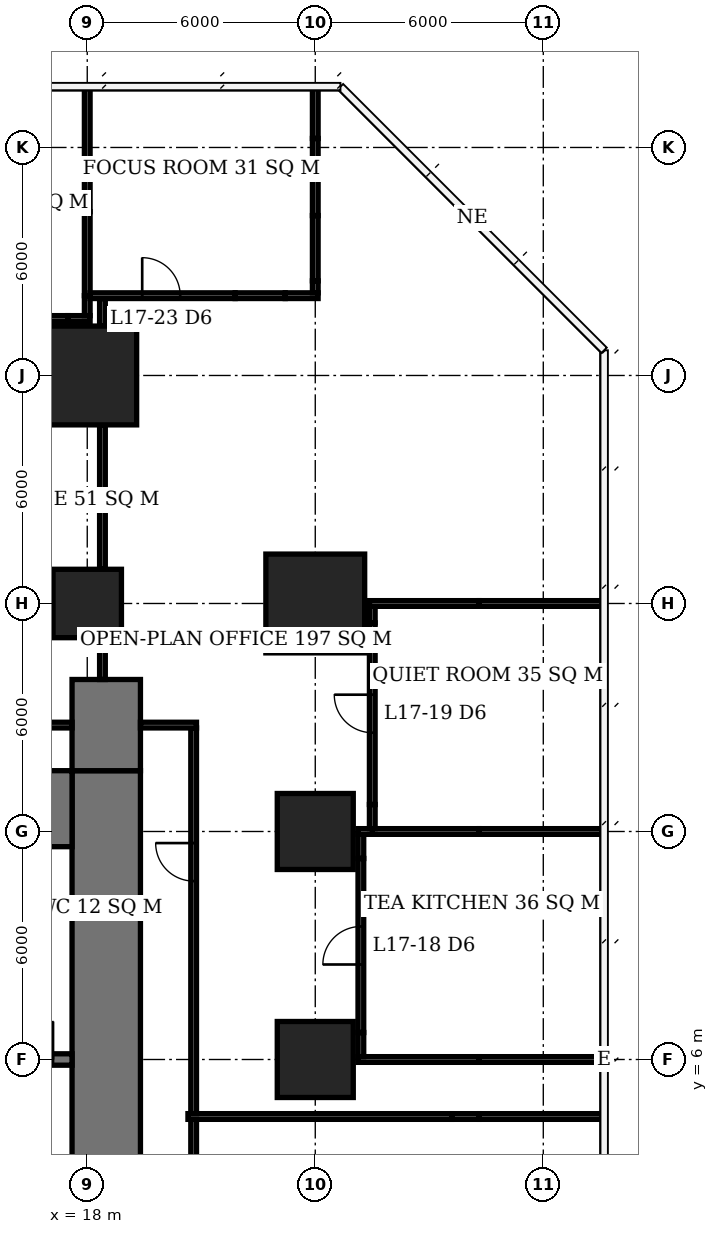
"""IFC4 building model, lengths in metres.
Left out: names, types, materials, properties, quantities, classifications, styles, units other than length and angle.
Written with IfcOpenShell. Run it as: python <this file> out.ifc"""

import sys

from ifc_helpers import new_model, si_unit, direction, frame, frame_2d, origin, origin_2d, place, context, subcontext, project, spatial, rectangle, extrude, element, fill, save


model = new_model("IFC4")
c1 = context("Model", 3, precision=1e-05, world=origin(), true_north=direction((0.0, 1.0)))
c2 = subcontext(c1, "Body", "Model", "MODEL_VIEW")
j1 = project(units=[si_unit("LENGTHUNIT", "METRE"), si_unit("PLANEANGLEUNIT", "RADIAN")], contexts=[c1])
p1 = place(None, origin())
s1 = spatial("IfcSite", under=j1, at=p1, CompositionType="ELEMENT")
p2 = place(p1, origin())
s2 = spatial("IfcBuilding", under=s1, at=p2, CompositionType="ELEMENT")
p3 = place(p2, frame((0.0, 0.0, 72.8)))
s3 = spatial("IfcBuildingStorey", under=s2, at=p3, CompositionType="ELEMENT", Elevation=72.8)
p4 = place(p3, frame((18.0, 18.0, 0.0), z_axis=(0.0, 0.0, 1.0), x_axis=(1.0, 0.0, 0.0)))
e1 = element("IfcColumn", 1, at=p4, inside=s3, PredefinedType="COLUMN", context=c2, shape_type="SweptSolid", body=[
    extrude(rectangle(XDim=1.8, YDim=1.8, at=origin_2d()), origin(), (0.0, 0.0, 1.0), 3.9),
])
p5 = place(p3, frame((18.0, 24.0, 0.0), z_axis=(0.0, 0.0, 1.0), x_axis=(1.0, 0.0, 0.0)))
e2 = element("IfcColumn", 2, at=p5, inside=s3, PredefinedType="COLUMN", context=c2, shape_type="SweptSolid", body=[
    extrude(rectangle(XDim=2.6, YDim=2.6, at=origin_2d()), origin(), (0.0, 0.0, 1.0), 3.9),
])
for number, where, z_axis, x_axis in (
    (3, (24.0, 6.0, 0.0), (0.0, 0.0, 1.0), (1.0, 0.0, 0.0)),
    (4, (24.0, 12.0, 0.0), (0.0, 0.0, 1.0), (1.0, 0.0, 0.0)),
):
    element("IfcColumn", number, at=place(p3, frame(where, z_axis=z_axis, x_axis=x_axis)), inside=s3, PredefinedType="COLUMN", context=c2, shape_type="SweptSolid", body=[
        extrude(rectangle(XDim=2.0, YDim=2.0, at=origin_2d()), origin(), (0.0, 0.0, 1.0), 3.9),
    ])
p6 = place(p3, frame((24.0, 18.0, 0.0), z_axis=(0.0, 0.0, 1.0), x_axis=(1.0, 0.0, 0.0)))
e5 = element("IfcColumn", 5, at=p6, inside=s3, PredefinedType="COLUMN", context=c2, shape_type="SweptSolid", body=[
    extrude(rectangle(XDim=2.6, YDim=2.6, at=origin_2d()), origin(), (0.0, 0.0, 1.0), 3.9),
])
p7 = place(p3, frame((-5.6, 12.6, 0.0), z_axis=(0.0, 0.0, 1.0), x_axis=(1.0, 0.0, 0.0)))
e6 = element("IfcWall", 6, at=p7, inside=s3, PredefinedType="SHEAR", context=c2, shape_type="SweptSolid", body=[
    extrude(rectangle(XDim=23.2, YDim=2.0, at=frame_2d((11.6, 0.0))), origin(), (0.0, 0.0, 1.0), 3.9),
])
p8 = place(p3, frame((18.5, -7.6, 0.0), z_axis=(0.0, 0.0, 1.0), x_axis=(0.0, 1.0, 0.0)))
e7 = element("IfcWall", 7, at=p8, inside=s3, PredefinedType="SHEAR", context=c2, shape_type="SweptSolid", body=[
    extrude(rectangle(XDim=21.2, YDim=1.8, at=frame_2d((10.6, 0.0))), origin(), (0.0, 0.0, 1.0), 3.9),
])
p9 = place(p8, frame((9.2, 0.0, 0.0)))
e8 = element("IfcOpeningElement", 8, at=p9, cuts=e7, PredefinedType="OPENING", context=c2, shape_type="SweptSolid", body=[
    extrude(rectangle(XDim=1.8, YDim=2.4, at=frame_2d((0.9, 1.2))), frame((0.0, 0.91, 0.0), z_axis=(0.0, -1.0, 0.0), x_axis=(1.0, 0.0, 0.0)), (0.0, 0.0, 1.0), 1.82),
])
p10 = place(p3, frame((18.5, 13.6, 0.0), z_axis=(0.0, 0.0, 1.0), x_axis=(0.0, 1.0, 0.0)))
e9 = element("IfcWall", 9, at=p10, inside=s3, PredefinedType="SHEAR", context=c2, shape_type="SweptSolid", body=[
    extrude(rectangle(XDim=2.4, YDim=1.8, at=frame_2d((1.2, 0.0))), origin(), (0.0, 0.0, 1.0), 3.9),
])
p11 = place(p3, frame((-0.15, 6.0, 0.0), z_axis=(0.0, 0.0, 1.0), x_axis=(1.0, 0.0, 0.0)))
e10 = element("IfcWall", 10, at=p11, inside=s3, PredefinedType="SHEAR", context=c2, shape_type="SweptSolid", body=[
    extrude(rectangle(XDim=17.75, YDim=0.3, at=frame_2d((8.875, 0.0))), origin(), (0.0, 0.0, 1.0), 3.9),
])
p12 = place(p11, frame((13.15, 0.0, 0.0)))
e11 = element("IfcOpeningElement", 11, at=p12, cuts=e10, PredefinedType="OPENING", context=c2, shape_type="SweptSolid", body=[
    extrude(rectangle(XDim=0.9, YDim=2.1, at=frame_2d((0.45, 1.05))), frame((0.0, 0.16, 0.0), z_axis=(0.0, -1.0, 0.0), x_axis=(1.0, 0.0, 0.0)), (0.0, 0.0, 1.0), 0.32),
])
p13 = place(p11, frame((16.25, 0.0, 0.0)))
e12 = element("IfcOpeningElement", 12, at=p13, cuts=e10, PredefinedType="OPENING", context=c2, shape_type="SweptSolid", body=[
    extrude(rectangle(XDim=1.0, YDim=2.1, at=frame_2d((0.5, 1.05))), frame((0.0, 0.16, 0.0), z_axis=(0.0, -1.0, 0.0), x_axis=(1.0, 0.0, 0.0)), (0.0, 0.0, 1.0), 0.32),
])
p14 = place(p11, frame((1.1, 0.0, 0.0)))
e13 = element("IfcOpeningElement", 13, at=p14, cuts=e10, PredefinedType="OPENING", context=c2, shape_type="SweptSolid", body=[
    extrude(rectangle(XDim=1.1, YDim=2.1, at=frame_2d((0.55, 1.05))), frame((0.0, 0.16, 0.0), z_axis=(0.0, -1.0, 0.0), x_axis=(1.0, 0.0, 0.0)), (0.0, 0.0, 1.0), 0.32),
])
p15 = place(p11, frame((4.1, 0.0, 0.0)))
e14 = element("IfcOpeningElement", 14, at=p15, cuts=e10, PredefinedType="OPENING", context=c2, shape_type="SweptSolid", body=[
    extrude(rectangle(XDim=1.1, YDim=2.1, at=frame_2d((0.55, 1.05))), frame((0.0, 0.16, 0.0), z_axis=(0.0, -1.0, 0.0), x_axis=(1.0, 0.0, 0.0)), (0.0, 0.0, 1.0), 0.32),
])
p16 = place(p11, frame((7.1, 0.0, 0.0)))
e15 = element("IfcOpeningElement", 15, at=p16, cuts=e10, PredefinedType="OPENING", context=c2, shape_type="SweptSolid", body=[
    extrude(rectangle(XDim=1.1, YDim=2.1, at=frame_2d((0.55, 1.05))), frame((0.0, 0.16, 0.0), z_axis=(0.0, -1.0, 0.0), x_axis=(1.0, 0.0, 0.0)), (0.0, 0.0, 1.0), 0.32),
])
p17 = place(p11, frame((10.1, 0.0, 0.0)))
e16 = element("IfcOpeningElement", 16, at=p17, cuts=e10, PredefinedType="OPENING", context=c2, shape_type="SweptSolid", body=[
    extrude(rectangle(XDim=1.1, YDim=2.1, at=frame_2d((0.55, 1.05))), frame((0.0, 0.16, 0.0), z_axis=(0.0, -1.0, 0.0), x_axis=(1.0, 0.0, 0.0)), (0.0, 0.0, 1.0), 0.32),
])
p18 = place(p3, frame((25.125, 6.0, 0.0), z_axis=(0.0, 0.0, 1.0), x_axis=(1.0, 0.0, 0.0)))
e17 = element("IfcWall", 17, at=p18, inside=s3, PredefinedType="PARTITIONING", context=c2, shape_type="SweptSolid", body=[
    extrude(rectangle(XDim=3.185, YDim=0.15, at=frame_2d((1.593, 0.0))), origin(), (0.0, 0.0, 1.0), 2.65),
])
p19 = place(p3, frame((28.31, 6.0, 0.0), z_axis=(0.0, 0.0, 1.0), x_axis=(1.0, 0.0, 0.0)))
e18 = element("IfcWall", 18, at=p19, inside=s3, PredefinedType="PARTITIONING", context=c2, shape_type="SweptSolid", body=[
    extrude(rectangle(XDim=3.24, YDim=0.15, at=frame_2d((1.62, 0.0))), origin(), (0.0, 0.0, 1.0), 3.65),
])
p20 = place(p3, frame((25.125, 12.0, 0.0), z_axis=(0.0, 0.0, 1.0), x_axis=(1.0, 0.0, 0.0)))
e19 = element("IfcWall", 19, at=p20, inside=s3, PredefinedType="PARTITIONING", context=c2, shape_type="SweptSolid", body=[
    extrude(rectangle(XDim=0.45, YDim=0.15, at=frame_2d((0.225, 0.0))), origin(), (0.0, 0.0, 1.0), 2.65),
])
p21 = place(p3, frame((25.5, 12.0, 0.0), z_axis=(0.0, 0.0, 1.0), x_axis=(1.0, 0.0, 0.0)))
e20 = element("IfcWall", 20, at=p21, inside=s3, PredefinedType="PARTITIONING", context=c2, shape_type="SweptSolid", body=[
    extrude(rectangle(XDim=2.81, YDim=0.15, at=frame_2d((1.405, 0.0))), origin(), (0.0, 0.0, 1.0), 2.65),
])
p22 = place(p3, frame((28.31, 12.0, 0.0), z_axis=(0.0, 0.0, 1.0), x_axis=(1.0, 0.0, 0.0)))
e21 = element("IfcWall", 21, at=p22, inside=s3, PredefinedType="PARTITIONING", context=c2, shape_type="SweptSolid", body=[
    extrude(rectangle(XDim=3.29, YDim=0.15, at=frame_2d((1.645, 0.0))), origin(), (0.0, 0.0, 1.0), 3.65),
])
p23 = place(p3, frame((25.425, 18.0, 0.0), z_axis=(0.0, 0.0, 1.0), x_axis=(1.0, 0.0, 0.0)))
e22 = element("IfcWall", 22, at=p23, inside=s3, PredefinedType="PARTITIONING", context=c2, shape_type="SweptSolid", body=[
    extrude(rectangle(XDim=2.885, YDim=0.15, at=frame_2d((1.442, 0.0))), origin(), (0.0, 0.0, 1.0), 2.65),
])
p24 = place(p3, frame((28.31, 18.0, 0.0), z_axis=(0.0, 0.0, 1.0), x_axis=(1.0, 0.0, 0.0)))
e23 = element("IfcWall", 23, at=p24, inside=s3, PredefinedType="PARTITIONING", context=c2, shape_type="SweptSolid", body=[
    extrude(rectangle(XDim=3.29, YDim=0.15, at=frame_2d((1.645, 0.0))), origin(), (0.0, 0.0, 1.0), 3.65),
])
p25 = place(p3, frame((12.71, 25.5, 0.0), z_axis=(0.0, 0.0, 1.0), x_axis=(1.0, 0.0, 0.0)))
e24 = element("IfcWall", 24, at=p25, inside=s3, PredefinedType="PARTITIONING", context=c2, shape_type="SweptSolid", body=[
    extrude(rectangle(XDim=4.78, YDim=0.15, at=frame_2d((2.39, 0.0))), origin(), (0.0, 0.0, 1.0), 3.65),
])
p26 = place(p25, frame((1.89, 0.0, 0.0)))
e25 = element("IfcOpeningElement", 25, at=p26, cuts=e24, PredefinedType="OPENING", context=c2, shape_type="SweptSolid", body=[
    extrude(rectangle(XDim=1.0, YDim=2.1, at=frame_2d((0.5, 1.05))), frame((0.0, 0.085, 0.0), z_axis=(0.0, -1.0, 0.0), x_axis=(1.0, 0.0, 0.0)), (0.0, 0.0, 1.0), 0.17),
])
p27 = place(p3, frame((17.49, 25.5, 0.0), z_axis=(0.0, 0.0, 1.0), x_axis=(1.0, 0.0, 0.0)))
e26 = element("IfcWall", 26, at=p27, inside=s3, PredefinedType="PARTITIONING", context=c2, shape_type="SweptSolid", body=[
    extrude(rectangle(XDim=0.585, YDim=0.15, at=frame_2d((0.292, 0.0))), origin(), (0.0, 0.0, 1.0), 2.65),
])
p28 = place(p3, frame((18.075, 26.1, 0.0), z_axis=(0.0, 0.0, 1.0), x_axis=(1.0, 0.0, 0.0)))
e27 = element("IfcWall", 27, at=p28, inside=s3, PredefinedType="PARTITIONING", context=c2, shape_type="SweptSolid", body=[
    extrude(rectangle(XDim=3.817, YDim=0.15, at=frame_2d((1.909, 0.0))), origin(), (0.0, 0.0, 1.0), 2.65),
])
p29 = place(p28, frame((1.371, 0.0, 0.0)))
e28 = element("IfcOpeningElement", 28, at=p29, cuts=e27, PredefinedType="OPENING", context=c2, shape_type="SweptSolid", body=[
    extrude(rectangle(XDim=1.0, YDim=2.1, at=frame_2d((0.5, 1.05))), frame((0.0, 0.085, 0.0), z_axis=(0.0, -1.0, 0.0), x_axis=(1.0, 0.0, 0.0)), (0.0, 0.0, 1.0), 0.17),
])
p30 = place(p3, frame((21.892, 26.1, 0.0), z_axis=(0.0, 0.0, 1.0), x_axis=(1.0, 0.0, 0.0)))
e29 = element("IfcWall", 29, at=p30, inside=s3, PredefinedType="PARTITIONING", context=c2, shape_type="SweptSolid", body=[
    extrude(rectangle(XDim=1.318, YDim=0.15, at=frame_2d((0.659, 0.0))), origin(), (0.0, 0.0, 1.0), 3.65),
])
p31 = place(p3, frame((23.21, 26.1, 0.0), z_axis=(0.0, 0.0, 1.0), x_axis=(1.0, 0.0, 0.0)))
e30 = element("IfcWall", 30, at=p31, inside=s3, PredefinedType="PARTITIONING", context=c2, shape_type="SweptSolid", body=[
    extrude(rectangle(XDim=0.865, YDim=0.15, at=frame_2d((0.433, 0.0))), origin(), (0.0, 0.0, 1.0), 2.65),
])
p32 = place(p3, frame((18.0, 25.575, 0.0), z_axis=(0.0, 0.0, 1.0), x_axis=(0.0, 1.0, 0.0)))
e31 = element("IfcWall", 31, at=p32, inside=s3, PredefinedType="PARTITIONING", context=c2, shape_type="SweptSolid", body=[
    extrude(rectangle(XDim=0.525, YDim=0.15, at=frame_2d((0.263, 0.0))), origin(), (0.0, 0.0, 1.0), 2.65),
])
p33 = place(p3, frame((18.0, 26.1, 0.0), z_axis=(0.0, 0.0, 1.0), x_axis=(0.0, 1.0, 0.0)))
e32 = element("IfcWall", 32, at=p33, inside=s3, PredefinedType="PARTITIONING", context=c2, shape_type="SweptSolid", body=[
    extrude(rectangle(XDim=2.21, YDim=0.15, at=frame_2d((1.105, 0.0))), origin(), (0.0, 0.0, 1.0), 2.65),
])
p34 = place(p3, frame((18.0, 28.31, 0.0), z_axis=(0.0, 0.0, 1.0), x_axis=(0.0, 1.0, 0.0)))
e33 = element("IfcWall", 33, at=p34, inside=s3, PredefinedType="PARTITIONING", context=c2, shape_type="SweptSolid", body=[
    extrude(rectangle(XDim=3.29, YDim=0.15, at=frame_2d((1.645, 0.0))), origin(), (0.0, 0.0, 1.0), 3.65),
])
p35 = place(p3, frame((24.0, 26.175, 0.0), z_axis=(0.0, 0.0, 1.0), x_axis=(0.0, 1.0, 0.0)))
e34 = element("IfcWall", 34, at=p35, inside=s3, PredefinedType="PARTITIONING", context=c2, shape_type="SweptSolid", body=[
    extrude(rectangle(XDim=0.315, YDim=0.15, at=frame_2d((0.157, 0.0))), origin(), (0.0, 0.0, 1.0), 2.65),
])
p36 = place(p3, frame((24.0, 26.49, 0.0), z_axis=(0.0, 0.0, 1.0), x_axis=(0.0, 1.0, 0.0)))
e35 = element("IfcWall", 35, at=p36, inside=s3, PredefinedType="PARTITIONING", context=c2, shape_type="SweptSolid", body=[
    extrude(rectangle(XDim=1.718, YDim=0.15, at=frame_2d((0.859, 0.0))), origin(), (0.0, 0.0, 1.0), 3.65),
])
p37 = place(p3, frame((24.0, 28.208, 0.0), z_axis=(0.0, 0.0, 1.0), x_axis=(0.0, 1.0, 0.0)))
e36 = element("IfcWall", 36, at=p37, inside=s3, PredefinedType="PARTITIONING", context=c2, shape_type="SweptSolid", body=[
    extrude(rectangle(XDim=2.029, YDim=0.15, at=frame_2d((1.015, 0.0))), origin(), (0.0, 0.0, 1.0), 2.65),
])
p38 = place(p3, frame((24.0, 30.237, 0.0), z_axis=(0.0, 0.0, 1.0), x_axis=(0.0, 1.0, 0.0)))
e37 = element("IfcWall", 37, at=p38, inside=s3, PredefinedType="PARTITIONING", context=c2, shape_type="SweptSolid", body=[
    extrude(rectangle(XDim=1.363, YDim=0.15, at=frame_2d((0.682, 0.0))), origin(), (0.0, 0.0, 1.0), 3.65),
])
p39 = place(p3, frame((25.2, 6.075, 0.0), z_axis=(0.0, 0.0, 1.0), x_axis=(0.0, 1.0, 0.0)))
e38 = element("IfcWall", 38, at=p39, inside=s3, PredefinedType="PARTITIONING", context=c2, shape_type="SweptSolid", body=[
    extrude(rectangle(XDim=0.635, YDim=0.15, at=frame_2d((0.317, 0.0))), origin(), (0.0, 0.0, 1.0), 2.65),
])
p40 = place(p3, frame((25.2, 6.71, 0.0), z_axis=(0.0, 0.0, 1.0), x_axis=(0.0, 1.0, 0.0)))
e39 = element("IfcWall", 39, at=p40, inside=s3, PredefinedType="PARTITIONING", context=c2, shape_type="SweptSolid", body=[
    extrude(rectangle(XDim=4.58, YDim=0.15, at=frame_2d((2.29, 0.0))), origin(), (0.0, 0.0, 1.0), 3.65),
])
p41 = place(p40, frame((1.79, 0.0, 0.0)))
e40 = element("IfcOpeningElement", 40, at=p41, cuts=e39, PredefinedType="OPENING", context=c2, shape_type="SweptSolid", body=[
    extrude(rectangle(XDim=1.0, YDim=2.1, at=frame_2d((0.5, 1.05))), frame((0.0, 0.085, 0.0), z_axis=(0.0, -1.0, 0.0), x_axis=(1.0, 0.0, 0.0)), (0.0, 0.0, 1.0), 0.17),
])
for number, where, z_axis, x_axis in (
    (41, (25.2, 11.29, 0.0), (0.0, 0.0, 1.0), (0.0, 1.0, 0.0)),
    (42, (25.5, 12.075, 0.0), (0.0, 0.0, 1.0), (0.0, 1.0, 0.0)),
):
    element("IfcWall", number, at=place(p3, frame(where, z_axis=z_axis, x_axis=x_axis)), inside=s3, PredefinedType="PARTITIONING", context=c2, shape_type="SweptSolid", body=[
        extrude(rectangle(XDim=0.635, YDim=0.15, at=frame_2d((0.317, 0.0))), origin(), (0.0, 0.0, 1.0), 2.65),
    ])
p42 = place(p3, frame((25.5, 12.71, 0.0), z_axis=(0.0, 0.0, 1.0), x_axis=(0.0, 1.0, 0.0)))
e43 = element("IfcWall", 43, at=p42, inside=s3, PredefinedType="PARTITIONING", context=c2, shape_type="SweptSolid", body=[
    extrude(rectangle(XDim=4.78, YDim=0.15, at=frame_2d((2.39, 0.0))), origin(), (0.0, 0.0, 1.0), 3.65),
])
p43 = place(p42, frame((1.89, 0.0, 0.0)))
e44 = element("IfcOpeningElement", 44, at=p43, cuts=e43, PredefinedType="OPENING", context=c2, shape_type="SweptSolid", body=[
    extrude(rectangle(XDim=1.0, YDim=2.1, at=frame_2d((0.5, 1.05))), frame((0.0, 0.085, 0.0), z_axis=(0.0, -1.0, 0.0), x_axis=(1.0, 0.0, 0.0)), (0.0, 0.0, 1.0), 0.17),
])
p44 = place(p3, frame((25.5, 17.49, 0.0), z_axis=(0.0, 0.0, 1.0), x_axis=(0.0, 1.0, 0.0)))
e45 = element("IfcWall", 45, at=p44, inside=s3, PredefinedType="PARTITIONING", context=c2, shape_type="SweptSolid", body=[
    extrude(rectangle(XDim=0.435, YDim=0.15, at=frame_2d((0.218, 0.0))), origin(), (0.0, 0.0, 1.0), 2.65),
])
p45 = place(p3, frame((13.575, 14.8, 0.0), z_axis=(0.0, 0.0, 1.0), x_axis=(1.0, 0.0, 0.0)))
e46 = element("IfcWall", 46, at=p45, inside=s3, PredefinedType="PARTITIONING", context=c2, shape_type="SweptSolid", body=[
    extrude(rectangle(XDim=4.025, YDim=0.15, at=frame_2d((2.013, 0.0))), origin(), (0.0, 0.0, 1.0), 3.65),
])
p46 = place(p45, frame((2.09, 0.0, 0.0)))
e47 = element("IfcOpeningElement", 47, at=p46, cuts=e46, PredefinedType="OPENING", context=c2, shape_type="SweptSolid", body=[
    extrude(rectangle(XDim=1.0, YDim=2.1, at=frame_2d((0.5, 1.05))), frame((0.0, 0.085, 0.0), z_axis=(0.0, -1.0, 0.0), x_axis=(1.0, 0.0, 0.0)), (0.0, 0.0, 1.0), 0.17),
])
p47 = place(p3, frame((18.4, 16.0, 0.0), z_axis=(0.0, 0.0, 1.0), x_axis=(0.0, 1.0, 0.0)))
e48 = element("IfcWall", 48, at=p47, inside=s3, PredefinedType="PARTITIONING", context=c2, shape_type="SweptSolid", body=[
    extrude(rectangle(XDim=1.1, YDim=0.15, at=frame_2d((0.55, 0.0))), origin(), (0.0, 0.0, 1.0), 3.65),
])
p48 = place(p3, frame((18.4, 18.9, 0.0), z_axis=(0.0, 0.0, 1.0), x_axis=(0.0, 1.0, 0.0)))
e49 = element("IfcWall", 49, at=p48, inside=s3, PredefinedType="PARTITIONING", context=c2, shape_type="SweptSolid", body=[
    extrude(rectangle(XDim=3.8, YDim=0.15, at=frame_2d((1.9, 0.0))), origin(), (0.0, 0.0, 1.0), 3.65),
])
p49 = place(p3, frame((18.4, 25.3, 0.0), z_axis=(0.0, 0.0, 1.0), x_axis=(0.0, 1.0, 0.0)))
e50 = element("IfcWall", 50, at=p49, inside=s3, PredefinedType="PARTITIONING", context=c2, shape_type="SweptSolid", body=[
    extrude(rectangle(XDim=0.725, YDim=0.15, at=frame_2d((0.362, 0.0))), origin(), (0.0, 0.0, 1.0), 2.65),
])
p50 = place(p3, frame((19.4, 14.8, 0.0), z_axis=(0.0, 0.0, 1.0), x_axis=(1.0, 0.0, 0.0)))
e51 = element("IfcWall", 51, at=p50, inside=s3, PredefinedType="PARTITIONING", context=c2, shape_type="SweptSolid", body=[
    extrude(rectangle(XDim=1.475, YDim=0.15, at=frame_2d((0.738, 0.0))), origin(), (0.0, 0.0, 1.0), 3.65),
])
p51 = place(p3, frame((20.8, -1.425, 0.0), z_axis=(0.0, 0.0, 1.0), x_axis=(0.0, 1.0, 0.0)))
e52 = element("IfcWall", 52, at=p51, inside=s3, PredefinedType="PARTITIONING", context=c2, shape_type="SweptSolid", body=[
    extrude(rectangle(XDim=5.85, YDim=0.15, at=frame_2d((2.925, 0.0))), origin(), (0.0, 0.0, 1.0), 3.65),
])
p52 = place(p51, frame((3.325, 0.0, 0.0)))
e53 = element("IfcOpeningElement", 53, at=p52, cuts=e52, PredefinedType="OPENING", context=c2, shape_type="SweptSolid", body=[
    extrude(rectangle(XDim=1.0, YDim=2.1, at=frame_2d((0.5, 1.05))), frame((0.0, 0.085, 0.0), z_axis=(0.0, -1.0, 0.0), x_axis=(1.0, 0.0, 0.0)), (0.0, 0.0, 1.0), 0.17),
])
p53 = place(p3, frame((20.8, 4.575, 0.0), z_axis=(0.0, 0.0, 1.0), x_axis=(0.0, 1.0, 0.0)))
e54 = element("IfcWall", 54, at=p53, inside=s3, PredefinedType="PARTITIONING", context=c2, shape_type="SweptSolid", body=[
    extrude(rectangle(XDim=10.15, YDim=0.15, at=frame_2d((5.075, 0.0))), origin(), (0.0, 0.0, 1.0), 3.65),
])
p54 = place(p53, frame((6.12, 0.0, 0.0)))
e55 = element("IfcOpeningElement", 55, at=p54, cuts=e54, PredefinedType="OPENING", context=c2, shape_type="SweptSolid", body=[
    extrude(rectangle(XDim=1.0, YDim=2.1, at=frame_2d((0.5, 1.05))), frame((0.0, 0.085, 0.0), z_axis=(0.0, -1.0, 0.0), x_axis=(1.0, 0.0, 0.0)), (0.0, 0.0, 1.0), 0.17),
])
p55 = place(p3, frame((20.65, 4.5, 0.0), z_axis=(0.0, 0.0, 1.0), x_axis=(1.0, 0.0, 0.0)))
e56 = element("IfcWall", 56, at=p55, inside=s3, PredefinedType="PARTITIONING", context=c2, shape_type="SweptSolid", body=[
    extrude(rectangle(XDim=6.94, YDim=0.15, at=frame_2d((3.47, 0.0))), origin(), (0.0, 0.0, 1.0), 3.65),
])
p56 = place(p3, frame((27.59, 4.5, 0.0), z_axis=(0.0, 0.0, 1.0), x_axis=(1.0, 0.0, 0.0)))
e57 = element("IfcWall", 57, at=p56, inside=s3, PredefinedType="PARTITIONING", context=c2, shape_type="SweptSolid", body=[
    extrude(rectangle(XDim=0.72, YDim=0.15, at=frame_2d((0.36, 0.0))), origin(), (0.0, 0.0, 1.0), 2.65),
])
p57 = place(p3, frame((28.31, 4.5, 0.0), z_axis=(0.0, 0.0, 1.0), x_axis=(1.0, 0.0, 0.0)))
e58 = element("IfcWall", 58, at=p57, inside=s3, PredefinedType="PARTITIONING", context=c2, shape_type="SweptSolid", body=[
    extrude(rectangle(XDim=3.29, YDim=0.15, at=frame_2d((1.645, 0.0))), origin(), (0.0, 0.0, 1.0), 3.65),
])
p58 = place(p13, origin())
e59 = element("IfcDoor", 59, at=p58, inside=s3, OperationType="SINGLE_SWING_RIGHT", PredefinedType="DOOR", context=c2, shape_type="SweptSolid", body=[
    extrude(rectangle(XDim=1.0, YDim=2.1, at=frame_2d((0.5, 1.05))), frame((0.0, 0.025, 0.0), z_axis=(0.0, -1.0, 0.0), x_axis=(1.0, 0.0, 0.0)), (0.0, 0.0, 1.0), 0.05),
])
fill(e12, e59)
p59 = place(p41, origin())
e60 = element("IfcDoor", 60, at=p59, inside=s3, OperationType="SINGLE_SWING_LEFT", PredefinedType="DOOR", context=c2, shape_type="SweptSolid", body=[
    extrude(rectangle(XDim=1.0, YDim=2.1, at=frame_2d((0.5, 1.05))), frame((0.0, 0.025, 0.0), z_axis=(0.0, -1.0, 0.0), x_axis=(1.0, 0.0, 0.0)), (0.0, 0.0, 1.0), 0.05),
])
fill(e40, e60)
p60 = place(p43, origin())
e61 = element("IfcDoor", 61, at=p60, inside=s3, OperationType="SINGLE_SWING_RIGHT", PredefinedType="DOOR", context=c2, shape_type="SweptSolid", body=[
    extrude(rectangle(XDim=1.0, YDim=2.1, at=frame_2d((0.5, 1.05))), frame((0.0, 0.025, 0.0), z_axis=(0.0, -1.0, 0.0), x_axis=(1.0, 0.0, 0.0)), (0.0, 0.0, 1.0), 0.05),
])
fill(e44, e61)
p61 = place(p29, origin())
e62 = element("IfcDoor", 62, at=p61, inside=s3, OperationType="SINGLE_SWING_LEFT", PredefinedType="DOOR", context=c2, shape_type="SweptSolid", body=[
    extrude(rectangle(XDim=1.0, YDim=2.1, at=frame_2d((0.5, 1.05))), frame((0.0, 0.025, 0.0), z_axis=(0.0, -1.0, 0.0), x_axis=(1.0, 0.0, 0.0)), (0.0, 0.0, 1.0), 0.05),
])
fill(e28, e62)
p62 = place(p54, origin())
e63 = element("IfcDoor", 63, at=p62, inside=s3, OperationType="SINGLE_SWING_RIGHT", PredefinedType="DOOR", context=c2, shape_type="SweptSolid", body=[
    extrude(rectangle(XDim=1.0, YDim=2.1, at=frame_2d((0.5, 1.05))), frame((0.0, 0.025, 0.0), z_axis=(0.0, -1.0, 0.0), x_axis=(1.0, 0.0, 0.0)), (0.0, 0.0, 1.0), 0.05),
])
fill(e55, e63)
save(model, sys.argv[1])
